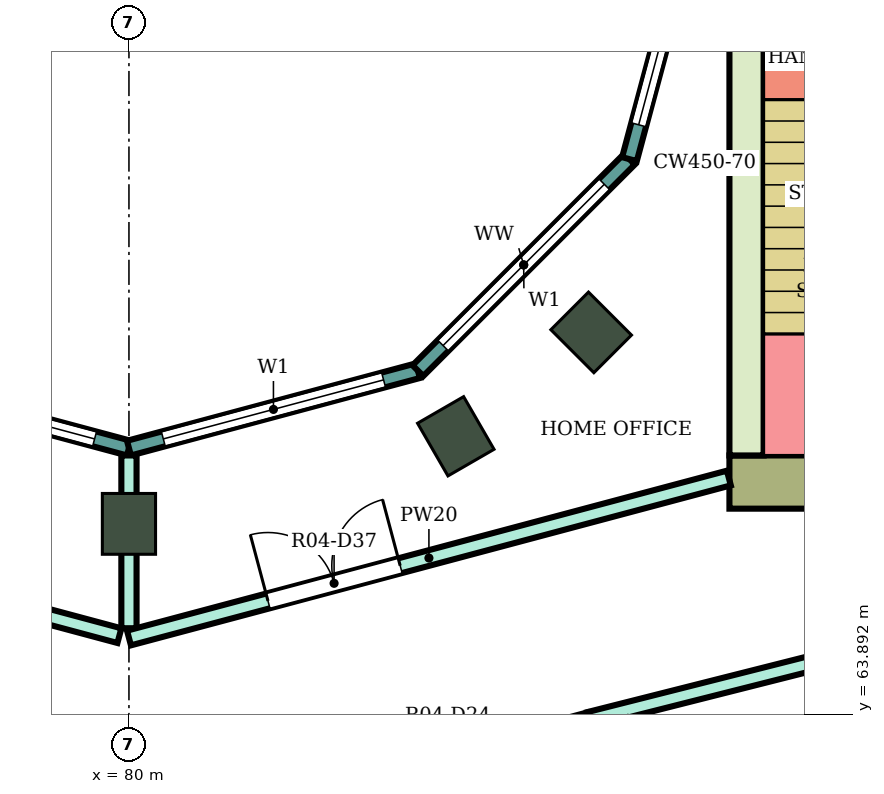
"""IFC4 building model, lengths in metres.
Left out: names, types, materials, properties, quantities, classifications, styles, units other than length and angle.
Written with IfcOpenShell. Run it as: python <this file> out.ifc"""

import sys

from ifc_helpers import new_model, si_unit, direction, frame, frame_2d, origin, origin_2d, place, context, subcontext, project, spatial, rectangle, extrude, element, fill, save


model = new_model("IFC4")
c1 = context("Model", 3, precision=1e-05, world=origin(), true_north=direction((0.0, 1.0)))
c2 = subcontext(c1, "Body", "Model", "MODEL_VIEW")
j1 = project(units=[si_unit("LENGTHUNIT", "METRE"), si_unit("PLANEANGLEUNIT", "RADIAN")], contexts=[c1])
p1 = place(None, origin())
s1 = spatial("IfcSite", under=j1, at=p1, CompositionType="ELEMENT")
p2 = place(p1, origin())
s2 = spatial("IfcBuilding", under=s1, at=p2, CompositionType="ELEMENT")
p3 = place(p2, frame((0.0, 0.0, 198.7)))
s3 = spatial("IfcBuildingStorey", under=s2, at=p3, CompositionType="ELEMENT", Elevation=198.7)
for number, where, z_axis, x_axis in (
    (1, (80.0, 66.4, 0.0), (0.0, 0.0, 1.0), (0.0, -1.0, 0.0)),
    (2, (84.3, 67.552, 0.0), (0.0, 0.0, 1.0), (0.5, -0.866, 0.0)),
    (3, (86.081, 68.919, 0.0), (0.0, 0.0, 1.0), (0.707, -0.707, 0.0)),
):
    element("IfcColumn", number, at=place(p3, frame(where, z_axis=z_axis, x_axis=x_axis)), inside=s3, PredefinedType="COLUMN", context=c2, shape_type="SweptSolid", body=[
        extrude(rectangle(XDim=0.8, YDim=0.7, at=origin_2d()), origin(), (0.0, 0.0, 1.0), 4.1),
    ])
p4 = place(p3, frame((87.9, 66.95, 0.0), z_axis=(0.0, 0.0, 1.0), x_axis=(1.0, 0.0, 0.0)))
e4 = element("IfcWall", 4, at=p4, inside=s3, PredefinedType="SHEAR", context=c2, shape_type="SweptSolid", body=[
    extrude(rectangle(XDim=14.8, YDim=0.7, at=frame_2d((7.4, 0.0))), origin(), (0.0, 0.0, 1.0), 3.78),
])
p5 = place(p4, frame((4.2, 0.0, 0.0)))
e5 = element("IfcOpeningElement", 5, at=p5, cuts=e4, PredefinedType="OPENING", context=c2, shape_type="SweptSolid", body=[
    extrude(rectangle(XDim=2.4, YDim=2.4, at=frame_2d((1.2, 1.2))), frame((0.0, 0.36, 0.0), z_axis=(0.0, -1.0, 0.0), x_axis=(1.0, 0.0, 0.0)), (0.0, 0.0, 1.0), 0.72),
])
p6 = place(p3, frame((88.125, 67.3, 0.0), z_axis=(0.0, 0.0, 1.0), x_axis=(0.0, 1.0, 0.0)))
e6 = element("IfcWall", 6, at=p6, inside=s3, PredefinedType="SHEAR", context=c2, shape_type="SweptSolid", body=[
    extrude(rectangle(XDim=7.7, YDim=0.45, at=frame_2d((3.85, 0.0))), origin(), (0.0, 0.0, 1.0), 3.78),
])
p7 = place(p3, frame((76.198, 68.415, 0.0), z_axis=(0.0, 0.0, 1.0), x_axis=(0.965933654434, -0.258789828301, 0.0)))
e7 = element("IfcWall", 7, at=p7, inside=s3, PredefinedType="NOTDEFINED", context=c2, shape_type="SweptSolid", body=[
    extrude(rectangle(XDim=3.936, YDim=0.2, at=frame_2d((1.968, 0.0))), origin(), (0.0, 0.0, 1.0), 4.1),
])
p8 = place(p7, frame((0.468, 0.0, 0.9)))
e8 = element("IfcOpeningElement", 8, at=p8, cuts=e7, PredefinedType="OPENING", context=c2, shape_type="SweptSolid", body=[
    extrude(rectangle(XDim=3.0, YDim=2.3, at=frame_2d((1.5, 1.15))), frame((0.0, 0.11, 0.0), z_axis=(0.0, -1.0, 0.0), x_axis=(1.0, 0.0, 0.0)), (0.0, 0.0, 1.0), 0.22),
])
p9 = place(p3, frame((80.0, 67.396, 0.0), z_axis=(0.0, 0.0, 1.0), x_axis=(0.965933654434, 0.258789828301, 0.0)))
e9 = element("IfcWall", 9, at=p9, inside=s3, PredefinedType="NOTDEFINED", context=c2, shape_type="SweptSolid", body=[
    extrude(rectangle(XDim=3.936, YDim=0.2, at=frame_2d((1.968, 0.0))), origin(), (0.0, 0.0, 1.0), 4.1),
])
p10 = place(p9, frame((0.468, 0.0, 0.9)))
e10 = element("IfcOpeningElement", 10, at=p10, cuts=e9, PredefinedType="OPENING", context=c2, shape_type="SweptSolid", body=[
    extrude(rectangle(XDim=3.0, YDim=2.3, at=frame_2d((1.5, 1.15))), frame((0.0, 0.11, 0.0), z_axis=(0.0, -1.0, 0.0), x_axis=(1.0, 0.0, 0.0)), (0.0, 0.0, 1.0), 0.22),
])
p11 = place(p3, frame((83.802, 68.415, 0.0), z_axis=(0.0, 0.0, 1.0), x_axis=(0.707106781187, 0.707106781187, 0.0)))
e11 = element("IfcWall", 11, at=p11, inside=s3, PredefinedType="NOTDEFINED", context=c2, shape_type="SweptSolid", body=[
    extrude(rectangle(XDim=3.936, YDim=0.2, at=frame_2d((1.968, 0.0))), origin(), (0.0, 0.0, 1.0), 4.1),
])
p12 = place(p11, frame((0.468, 0.0, 0.9)))
e12 = element("IfcOpeningElement", 12, at=p12, cuts=e11, PredefinedType="OPENING", context=c2, shape_type="SweptSolid", body=[
    extrude(rectangle(XDim=3.0, YDim=2.3, at=frame_2d((1.5, 1.15))), frame((0.0, 0.11, 0.0), z_axis=(0.0, -1.0, 0.0), x_axis=(1.0, 0.0, 0.0)), (0.0, 0.0, 1.0), 0.22),
])
p13 = place(p3, frame((86.585, 71.198, 0.0), z_axis=(0.0, 0.0, 1.0), x_axis=(0.258789828301, 0.965933654434, 0.0)))
e13 = element("IfcWall", 13, at=p13, inside=s3, PredefinedType="NOTDEFINED", context=c2, shape_type="SweptSolid", body=[
    extrude(rectangle(XDim=3.936, YDim=0.2, at=frame_2d((1.968, 0.0))), origin(), (0.0, 0.0, 1.0), 4.1),
])
p14 = place(p13, frame((0.468, 0.0, 0.9)))
e14 = element("IfcOpeningElement", 14, at=p14, cuts=e13, PredefinedType="OPENING", context=c2, shape_type="SweptSolid", body=[
    extrude(rectangle(XDim=3.0, YDim=2.3, at=frame_2d((1.5, 1.15))), frame((0.0, 0.11, 0.0), z_axis=(0.0, -1.0, 0.0), x_axis=(1.0, 0.0, 0.0)), (0.0, 0.0, 1.0), 0.22),
])
p15 = place(p3, frame((73.947, 63.826, 0.0), z_axis=(0.0, 0.0, 1.0), x_axis=(0.965908253407, -0.258884619088, 0.0)))
e15 = element("IfcWall", 15, at=p15, inside=s3, PredefinedType="PARTITIONING", context=c2, shape_type="SweptSolid", body=[
    extrude(rectangle(XDim=6.217, YDim=0.2, at=frame_2d((3.108, 0.0))), origin(), (0.0, 0.0, 1.0), 3.65),
])
p16 = place(p15, frame((1.424, 0.0, 0.0)))
e16 = element("IfcOpeningElement", 16, at=p16, cuts=e15, PredefinedType="OPENING", context=c2, shape_type="SweptSolid", body=[
    extrude(rectangle(XDim=1.0, YDim=2.1, at=frame_2d((0.5, 1.05))), frame((0.0, 0.11, 0.0), z_axis=(0.0, -1.0, 0.0), x_axis=(1.0, 0.0, 0.0)), (0.0, 0.0, 1.0), 0.22),
])
p17 = place(p3, frame((74.603, 66.342, 0.0), z_axis=(0.0, 0.0, 1.0), x_axis=(0.965920893652, -0.258837453254, 0.0)))
e17 = element("IfcWall", 17, at=p17, inside=s3, PredefinedType="PARTITIONING", context=c2, shape_type="SweptSolid", body=[
    extrude(rectangle(XDim=5.458, YDim=0.2, at=frame_2d((2.729, 0.0))), origin(), (0.0, 0.0, 1.0), 3.65),
])
p18 = place(p17, frame((2.512, 0.0, 0.0)))
e18 = element("IfcOpeningElement", 18, at=p18, cuts=e17, PredefinedType="OPENING", context=c2, shape_type="SweptSolid", body=[
    extrude(rectangle(XDim=0.9, YDim=2.1, at=frame_2d((0.45, 1.05))), frame((0.0, 0.11, 0.0), z_axis=(0.0, -1.0, 0.0), x_axis=(1.0, 0.0, 0.0)), (0.0, 0.0, 1.0), 0.22),
])
p19 = place(p3, frame((80.048, 62.217, 0.0), z_axis=(0.0, 0.0, 1.0), x_axis=(0.966097920642, 0.258175923996, 0.0)))
e19 = element("IfcWall", 19, at=p19, inside=s3, PredefinedType="PARTITIONING", context=c2, shape_type="SweptSolid", body=[
    extrude(rectangle(XDim=6.217, YDim=0.2, at=frame_2d((3.108, 0.0))), origin(), (0.0, 0.0, 1.0), 3.65),
])
p20 = place(p19, frame((3.792, 0.0, 0.0)))
e20 = element("IfcOpeningElement", 20, at=p20, cuts=e19, PredefinedType="OPENING", context=c2, shape_type="SweptSolid", body=[
    extrude(rectangle(XDim=1.0, YDim=2.1, at=frame_2d((0.5, 1.05))), frame((0.0, 0.11, 0.0), z_axis=(0.0, -1.0, 0.0), x_axis=(1.0, 0.0, 0.0)), (0.0, 0.0, 1.0), 0.22),
])
p21 = place(p3, frame((80.0, 65.027, 0.0), z_axis=(0.0, 0.0, 1.0), x_axis=(0.0, 1.0, 0.0)))
e21 = element("IfcWall", 21, at=p21, inside=s3, PredefinedType="PARTITIONING", context=c2, shape_type="SweptSolid", body=[
    extrude(rectangle(XDim=2.273, YDim=0.2, at=frame_2d((1.136, 0.0))), origin(), (0.0, 0.0, 1.0), 3.65),
])
p22 = place(p3, frame((80.0, 64.898, 0.0), z_axis=(0.0, 0.0, 1.0), x_axis=(0.966236923997, 0.25765520896, 0.0)))
e22 = element("IfcWall", 22, at=p22, inside=s3, PredefinedType="PARTITIONING", context=c2, shape_type="SweptSolid", body=[
    extrude(rectangle(XDim=8.168, YDim=0.2, at=frame_2d((4.084, 0.0))), origin(), (0.0, 0.0, 1.0), 3.65),
])
p23 = place(p22, frame((1.893, 0.0, 0.0)))
e23 = element("IfcOpeningElement", 23, at=p23, cuts=e22, PredefinedType="OPENING", context=c2, shape_type="SweptSolid", body=[
    extrude(rectangle(XDim=1.8, YDim=2.1, at=frame_2d((0.9, 1.05))), frame((0.0, 0.11, 0.0), z_axis=(0.0, -1.0, 0.0), x_axis=(1.0, 0.0, 0.0)), (0.0, 0.0, 1.0), 0.22),
])
p24 = place(p3, frame((86.053, 63.826, 0.0), z_axis=(0.0, 0.0, 1.0), x_axis=(0.969490004987, 0.245130843083, 0.0)))
e24 = element("IfcWall", 24, at=p24, inside=s3, PredefinedType="PARTITIONING", context=c2, shape_type="SweptSolid", body=[
    extrude(rectangle(XDim=5.908, YDim=0.2, at=frame_2d((2.954, 0.0))), origin(), (0.0, 0.0, 1.0), 3.65),
])
p25 = place(p8, origin())
e25 = element("IfcWindow", 25, at=p25, inside=s3, PartitioningType="SINGLE_PANEL", PredefinedType="WINDOW", context=c2, shape_type="SweptSolid", body=[
    extrude(rectangle(XDim=3.0, YDim=2.3, at=frame_2d((1.5, 1.15))), frame((0.0, 0.03, 0.0), z_axis=(0.0, -1.0, 0.0), x_axis=(1.0, 0.0, 0.0)), (0.0, 0.0, 1.0), 0.06),
])
fill(e8, e25)
p26 = place(p10, origin())
e26 = element("IfcWindow", 26, at=p26, inside=s3, PartitioningType="SINGLE_PANEL", PredefinedType="WINDOW", context=c2, shape_type="SweptSolid", body=[
    extrude(rectangle(XDim=3.0, YDim=2.3, at=frame_2d((1.5, 1.15))), frame((0.0, 0.03, 0.0), z_axis=(0.0, -1.0, 0.0), x_axis=(1.0, 0.0, 0.0)), (0.0, 0.0, 1.0), 0.06),
])
fill(e10, e26)
p27 = place(p12, origin())
e27 = element("IfcWindow", 27, at=p27, inside=s3, PartitioningType="SINGLE_PANEL", PredefinedType="WINDOW", context=c2, shape_type="SweptSolid", body=[
    extrude(rectangle(XDim=3.0, YDim=2.3, at=frame_2d((1.5, 1.15))), frame((0.0, 0.03, 0.0), z_axis=(0.0, -1.0, 0.0), x_axis=(1.0, 0.0, 0.0)), (0.0, 0.0, 1.0), 0.06),
])
fill(e12, e27)
p28 = place(p14, origin())
e28 = element("IfcWindow", 28, at=p28, inside=s3, PartitioningType="SINGLE_PANEL", PredefinedType="WINDOW", context=c2, shape_type="SweptSolid", body=[
    extrude(rectangle(XDim=3.0, YDim=2.3, at=frame_2d((1.5, 1.15))), frame((0.0, 0.03, 0.0), z_axis=(0.0, -1.0, 0.0), x_axis=(1.0, 0.0, 0.0)), (0.0, 0.0, 1.0), 0.06),
])
fill(e14, e28)
p29 = place(p23, origin())
e29 = element("IfcDoor", 29, at=p29, inside=s3, OperationType="DOUBLE_DOOR_SINGLE_SWING", PredefinedType="DOOR", context=c2, shape_type="SweptSolid", body=[
    extrude(rectangle(XDim=1.8, YDim=2.1, at=frame_2d((0.9, 1.05))), frame((0.0, 0.025, 0.0), z_axis=(0.0, -1.0, 0.0), x_axis=(1.0, 0.0, 0.0)), (0.0, 0.0, 1.0), 0.05),
])
fill(e23, e29)
save(model, sys.argv[1])
